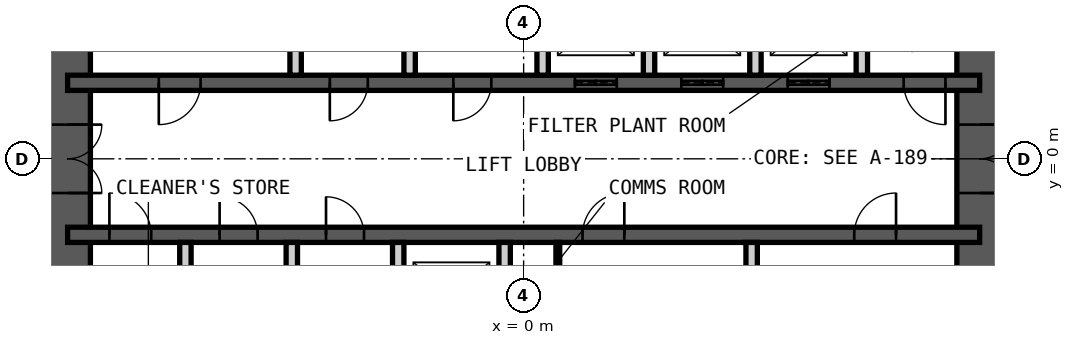
"""IFC4 building model, lengths in metres.
Left out: names, types, materials, properties, quantities, classifications, styles, units other than length and angle.
Written with IfcOpenShell. Run it as: python <this file> out.ifc"""

import sys

from ifc_helpers import new_model, si_unit, direction, frame, frame_2d, origin, place, context, subcontext, project, spatial, rectangle, extrude, element, fill, save


model = new_model("IFC4")
c1 = context("Model", 3, precision=1e-05, world=origin(), true_north=direction((0.0, 1.0)))
c2 = subcontext(c1, "Body", "Model", "MODEL_VIEW")
j1 = project(units=[si_unit("LENGTHUNIT", "METRE"), si_unit("PLANEANGLEUNIT", "RADIAN")], contexts=[c1])
p1 = place(None, origin())
s1 = spatial("IfcSite", under=j1, at=p1, CompositionType="ELEMENT")
p2 = place(p1, origin())
s2 = spatial("IfcBuilding", under=s1, at=p2, CompositionType="ELEMENT")
p3 = place(p2, frame((0.0, 0.0, 239.2)))
s3 = spatial("IfcBuildingStorey", under=s2, at=p3, CompositionType="ELEMENT", Elevation=239.2)
p4 = place(p3, frame((12.0, -9.0, 0.0), z_axis=(0.0, 0.0, 1.0), x_axis=(0.0, 1.0, 0.0)))
e1 = element("IfcWall", 1, at=p4, inside=s3, PredefinedType="SHEAR", context=c2, shape_type="SweptSolid", body=[
    extrude(rectangle(XDim=18.0, YDim=1.2, at=frame_2d((9.0, 0.0))), origin(), (0.0, 0.0, 1.0), 4.2),
])
p5 = place(p4, frame((8.1, 0.0, 0.0)))
e2 = element("IfcOpeningElement", 2, at=p5, cuts=e1, PredefinedType="OPENING", context=c2, shape_type="SweptSolid", body=[
    extrude(rectangle(XDim=1.8, YDim=2.1, at=frame_2d((0.9, 1.05))), frame((0.0, 0.61, 0.0), z_axis=(0.0, -1.0, 0.0), x_axis=(1.0, 0.0, 0.0)), (0.0, 0.0, 1.0), 1.22),
])
p6 = place(p3, frame((-12.0, -9.0, 0.0), z_axis=(0.0, 0.0, 1.0), x_axis=(0.0, 1.0, 0.0)))
e3 = element("IfcWall", 3, at=p6, inside=s3, PredefinedType="SHEAR", context=c2, shape_type="SweptSolid", body=[
    extrude(rectangle(XDim=18.0, YDim=1.2, at=frame_2d((9.0, 0.0))), origin(), (0.0, 0.0, 1.0), 4.2),
])
p7 = place(p6, frame((8.1, 0.0, 0.0)))
e4 = element("IfcOpeningElement", 4, at=p7, cuts=e3, PredefinedType="OPENING", context=c2, shape_type="SweptSolid", body=[
    extrude(rectangle(XDim=1.8, YDim=2.1, at=frame_2d((0.9, 1.05))), frame((0.0, 0.61, 0.0), z_axis=(0.0, -1.0, 0.0), x_axis=(1.0, 0.0, 0.0)), (0.0, 0.0, 1.0), 1.22),
])
p8 = place(p3, frame((-12.0, 2.0, 0.0), z_axis=(0.0, 0.0, 1.0), x_axis=(1.0, 0.0, 0.0)))
e5 = element("IfcWall", 5, at=p8, inside=s3, PredefinedType="SHEAR", context=c2, shape_type="SweptSolid", body=[
    extrude(rectangle(XDim=24.0, YDim=0.4, at=frame_2d((12.0, 0.0))), origin(), (0.0, 0.0, 1.0), 4.2),
])
p9 = place(p8, frame((2.4, 0.0, 0.0)))
e6 = element("IfcOpeningElement", 6, at=p9, cuts=e5, PredefinedType="OPENING", context=c2, shape_type="SweptSolid", body=[
    extrude(rectangle(XDim=1.1, YDim=2.1, at=frame_2d((0.55, 1.05))), frame((0.0, 0.21, 0.0), z_axis=(0.0, -1.0, 0.0), x_axis=(1.0, 0.0, 0.0)), (0.0, 0.0, 1.0), 0.42),
])
p10 = place(p8, frame((22.0, 0.0, 0.0)))
e7 = element("IfcOpeningElement", 7, at=p10, cuts=e5, PredefinedType="OPENING", context=c2, shape_type="SweptSolid", body=[
    extrude(rectangle(XDim=1.1, YDim=2.1, at=frame_2d((0.55, 1.05))), frame((0.0, 0.21, 0.0), z_axis=(0.0, -1.0, 0.0), x_axis=(1.0, 0.0, 0.0)), (0.0, 0.0, 1.0), 0.42),
])
p11 = place(p8, frame((10.15, 0.0, 0.0)))
e8 = element("IfcOpeningElement", 8, at=p11, cuts=e5, PredefinedType="OPENING", context=c2, shape_type="SweptSolid", body=[
    extrude(rectangle(XDim=1.0, YDim=2.1, at=frame_2d((0.5, 1.05))), frame((0.0, 0.21, 0.0), z_axis=(0.0, -1.0, 0.0), x_axis=(1.0, 0.0, 0.0)), (0.0, 0.0, 1.0), 0.42),
])
p12 = place(p8, frame((6.9, 0.0, 0.0)))
e9 = element("IfcOpeningElement", 9, at=p12, cuts=e5, PredefinedType="OPENING", context=c2, shape_type="SweptSolid", body=[
    extrude(rectangle(XDim=1.0, YDim=2.1, at=frame_2d((0.5, 1.05))), frame((0.0, 0.21, 0.0), z_axis=(0.0, -1.0, 0.0), x_axis=(1.0, 0.0, 0.0)), (0.0, 0.0, 1.0), 0.42),
])
p13 = place(p8, frame((13.35, 0.0, 0.0)))
e10 = element("IfcOpeningElement", 10, at=p13, cuts=e5, PredefinedType="OPENING", context=c2, shape_type="SweptSolid", body=[
    extrude(rectangle(XDim=1.1, YDim=2.4, at=frame_2d((0.55, 1.2))), frame((0.0, 0.21, 0.0), z_axis=(0.0, -1.0, 0.0), x_axis=(1.0, 0.0, 0.0)), (0.0, 0.0, 1.0), 0.42),
])
p14 = place(p8, frame((16.15, 0.0, 0.0)))
e11 = element("IfcOpeningElement", 11, at=p14, cuts=e5, PredefinedType="OPENING", context=c2, shape_type="SweptSolid", body=[
    extrude(rectangle(XDim=1.1, YDim=2.4, at=frame_2d((0.55, 1.2))), frame((0.0, 0.21, 0.0), z_axis=(0.0, -1.0, 0.0), x_axis=(1.0, 0.0, 0.0)), (0.0, 0.0, 1.0), 0.42),
])
p15 = place(p8, frame((18.95, 0.0, 0.0)))
e12 = element("IfcOpeningElement", 12, at=p15, cuts=e5, PredefinedType="OPENING", context=c2, shape_type="SweptSolid", body=[
    extrude(rectangle(XDim=1.1, YDim=2.4, at=frame_2d((0.55, 1.2))), frame((0.0, 0.21, 0.0), z_axis=(0.0, -1.0, 0.0), x_axis=(1.0, 0.0, 0.0)), (0.0, 0.0, 1.0), 0.42),
])
p16 = place(p3, frame((-12.0, -2.0, 0.0), z_axis=(0.0, 0.0, 1.0), x_axis=(1.0, 0.0, 0.0)))
e13 = element("IfcWall", 13, at=p16, inside=s3, PredefinedType="SHEAR", context=c2, shape_type="SweptSolid", body=[
    extrude(rectangle(XDim=24.0, YDim=0.4, at=frame_2d((12.0, 0.0))), origin(), (0.0, 0.0, 1.0), 4.2),
])
p17 = place(p16, frame((1.1, 0.0, 0.0)))
e14 = element("IfcOpeningElement", 14, at=p17, cuts=e13, PredefinedType="OPENING", context=c2, shape_type="SweptSolid", body=[
    extrude(rectangle(XDim=1.1, YDim=2.1, at=frame_2d((0.55, 1.05))), frame((0.0, 0.21, 0.0), z_axis=(0.0, -1.0, 0.0), x_axis=(1.0, 0.0, 0.0)), (0.0, 0.0, 1.0), 0.42),
])
p18 = place(p16, frame((13.55, 0.0, 0.0)))
e15 = element("IfcOpeningElement", 15, at=p18, cuts=e13, PredefinedType="OPENING", context=c2, shape_type="SweptSolid", body=[
    extrude(rectangle(XDim=1.1, YDim=2.1, at=frame_2d((0.55, 1.05))), frame((0.0, 0.21, 0.0), z_axis=(0.0, -1.0, 0.0), x_axis=(1.0, 0.0, 0.0)), (0.0, 0.0, 1.0), 0.42),
])
p19 = place(p16, frame((20.7, 0.0, 0.0)))
e16 = element("IfcOpeningElement", 16, at=p19, cuts=e13, PredefinedType="OPENING", context=c2, shape_type="SweptSolid", body=[
    extrude(rectangle(XDim=1.1, YDim=2.1, at=frame_2d((0.55, 1.05))), frame((0.0, 0.21, 0.0), z_axis=(0.0, -1.0, 0.0), x_axis=(1.0, 0.0, 0.0)), (0.0, 0.0, 1.0), 0.42),
])
p20 = place(p16, frame((4.0, 0.0, 0.0)))
e17 = element("IfcOpeningElement", 17, at=p20, cuts=e13, PredefinedType="OPENING", context=c2, shape_type="SweptSolid", body=[
    extrude(rectangle(XDim=1.0, YDim=2.1, at=frame_2d((0.5, 1.05))), frame((0.0, 0.21, 0.0), z_axis=(0.0, -1.0, 0.0), x_axis=(1.0, 0.0, 0.0)), (0.0, 0.0, 1.0), 0.42),
])
p21 = place(p16, frame((6.8, 0.0, 0.0)))
e18 = element("IfcOpeningElement", 18, at=p21, cuts=e13, PredefinedType="OPENING", context=c2, shape_type="SweptSolid", body=[
    extrude(rectangle(XDim=1.0, YDim=2.1, at=frame_2d((0.5, 1.05))), frame((0.0, 0.21, 0.0), z_axis=(0.0, -1.0, 0.0), x_axis=(1.0, 0.0, 0.0)), (0.0, 0.0, 1.0), 0.42),
])
for number, where, z_axis, x_axis in (
    (19, (-6.0, 2.2, 0.0), (0.0, 0.0, 1.0), (0.0, 1.0, 0.0)),
    (20, (-3.0, 2.2, 0.0), (0.0, 0.0, 1.0), (0.0, 1.0, 0.0)),
    (21, (0.5, 2.2, 0.0), (0.0, 0.0, 1.0), (0.0, 1.0, 0.0)),
    (22, (3.3, 2.2, 0.0), (0.0, 0.0, 1.0), (0.0, 1.0, 0.0)),
    (23, (6.1, 2.2, 0.0), (0.0, 0.0, 1.0), (0.0, 1.0, 0.0)),
    (24, (8.9, 2.2, 0.0), (0.0, 0.0, 1.0), (0.0, 1.0, 0.0)),
    (25, (-8.9, -4.85, 0.0), (0.0, 0.0, 1.0), (0.0, 1.0, 0.0)),
    (26, (-6.1, -4.85, 0.0), (0.0, 0.0, 1.0), (0.0, 1.0, 0.0)),
    (27, (-3.3, -4.85, 0.0), (0.0, 0.0, 1.0), (0.0, 1.0, 0.0)),
    (28, (-0.5, -4.85, 0.0), (0.0, 0.0, 1.0), (0.0, 1.0, 0.0)),
    (29, (6.0, -4.85, 0.0), (0.0, 0.0, 1.0), (0.0, 1.0, 0.0)),
):
    element("IfcWall", number, at=place(p3, frame(where, z_axis=z_axis, x_axis=x_axis)), inside=s3, PredefinedType="PARTITIONING", context=c2, shape_type="SweptSolid", body=[
        extrude(rectangle(XDim=2.65, YDim=0.3, at=frame_2d((1.325, 0.0))), origin(), (0.0, 0.0, 1.0), 3.98),
    ])
p22 = place(p3, frame((0.9, -4.85, 0.0), z_axis=(0.0, 0.0, 1.0), x_axis=(0.0, 1.0, 0.0)))
e30 = element("IfcWall", 30, at=p22, inside=s3, PredefinedType="PARTITIONING", context=c2, shape_type="SweptSolid", body=[
    extrude(rectangle(XDim=2.65, YDim=0.1, at=frame_2d((1.325, 0.0))), origin(), (0.0, 0.0, 1.0), 3.98),
])
p23 = place(p22, frame((0.1, 0.0, 0.0)))
e31 = element("IfcOpeningElement", 31, at=p23, cuts=e30, PredefinedType="OPENING", context=c2, shape_type="SweptSolid", body=[
    extrude(rectangle(XDim=1.0, YDim=2.4, at=frame_2d((0.5, 1.2))), frame((0.0, 0.06, 0.0), z_axis=(0.0, -1.0, 0.0), x_axis=(1.0, 0.0, 0.0)), (0.0, 0.0, 1.0), 0.12),
])
p24 = place(p9, origin())
e32 = element("IfcDoor", 32, at=p24, inside=s3, OperationType="SINGLE_SWING_LEFT", PredefinedType="DOOR", context=c2, shape_type="SweptSolid", body=[
    extrude(rectangle(XDim=1.1, YDim=2.1, at=frame_2d((0.55, 1.05))), frame((0.0, 0.025, 0.0), z_axis=(0.0, -1.0, 0.0), x_axis=(1.0, 0.0, 0.0)), (0.0, 0.0, 1.0), 0.05),
])
fill(e6, e32)
p25 = place(p17, origin())
e33 = element("IfcDoor", 33, at=p25, inside=s3, OperationType="SINGLE_SWING_RIGHT", PredefinedType="DOOR", context=c2, shape_type="SweptSolid", body=[
    extrude(rectangle(XDim=1.1, YDim=2.1, at=frame_2d((0.55, 1.05))), frame((0.0, 0.025, 0.0), z_axis=(0.0, -1.0, 0.0), x_axis=(1.0, 0.0, 0.0)), (0.0, 0.0, 1.0), 0.05),
])
fill(e14, e33)
p26 = place(p10, origin())
e34 = element("IfcDoor", 34, at=p26, inside=s3, OperationType="SINGLE_SWING_RIGHT", PredefinedType="DOOR", context=c2, shape_type="SweptSolid", body=[
    extrude(rectangle(XDim=1.1, YDim=2.1, at=frame_2d((0.55, 1.05))), frame((0.0, 0.025, 0.0), z_axis=(0.0, -1.0, 0.0), x_axis=(1.0, 0.0, 0.0)), (0.0, 0.0, 1.0), 0.05),
])
fill(e7, e34)
p27 = place(p11, origin())
e35 = element("IfcDoor", 35, at=p27, inside=s3, OperationType="SINGLE_SWING_LEFT", PredefinedType="DOOR", context=c2, shape_type="SweptSolid", body=[
    extrude(rectangle(XDim=1.0, YDim=2.1, at=frame_2d((0.5, 1.05))), frame((0.0, 0.025, 0.0), z_axis=(0.0, -1.0, 0.0), x_axis=(1.0, 0.0, 0.0)), (0.0, 0.0, 1.0), 0.05),
])
fill(e8, e35)
p28 = place(p18, origin())
e36 = element("IfcDoor", 36, at=p28, inside=s3, OperationType="SINGLE_SWING_LEFT", PredefinedType="DOOR", context=c2, shape_type="SweptSolid", body=[
    extrude(rectangle(XDim=1.1, YDim=2.1, at=frame_2d((0.55, 1.05))), frame((0.0, 0.025, 0.0), z_axis=(0.0, -1.0, 0.0), x_axis=(1.0, 0.0, 0.0)), (0.0, 0.0, 1.0), 0.05),
])
fill(e15, e36)
p29 = place(p19, origin())
e37 = element("IfcDoor", 37, at=p29, inside=s3, OperationType="SINGLE_SWING_LEFT", PredefinedType="DOOR", context=c2, shape_type="SweptSolid", body=[
    extrude(rectangle(XDim=1.1, YDim=2.1, at=frame_2d((0.55, 1.05))), frame((0.0, 0.025, 0.0), z_axis=(0.0, -1.0, 0.0), x_axis=(1.0, 0.0, 0.0)), (0.0, 0.0, 1.0), 0.05),
])
fill(e16, e37)
p30 = place(p5, origin())
e38 = element("IfcDoor", 38, at=p30, inside=s3, OperationType="DOUBLE_DOOR_DOUBLE_SWING", PredefinedType="DOOR", context=c2, shape_type="SweptSolid", body=[
    extrude(rectangle(XDim=1.8, YDim=2.1, at=frame_2d((0.9, 1.05))), frame((0.0, 0.025, 0.0), z_axis=(0.0, -1.0, 0.0), x_axis=(1.0, 0.0, 0.0)), (0.0, 0.0, 1.0), 0.05),
])
fill(e2, e38)
p31 = place(p7, origin())
e39 = element("IfcDoor", 39, at=p31, inside=s3, OperationType="DOUBLE_DOOR_DOUBLE_SWING", PredefinedType="DOOR", context=c2, shape_type="SweptSolid", body=[
    extrude(rectangle(XDim=1.8, YDim=2.1, at=frame_2d((0.9, 1.05))), frame((0.0, 0.025, 0.0), z_axis=(0.0, -1.0, 0.0), x_axis=(1.0, 0.0, 0.0)), (0.0, 0.0, 1.0), 0.05),
])
fill(e4, e39)
p32 = place(p12, origin())
e40 = element("IfcDoor", 40, at=p32, inside=s3, OperationType="SINGLE_SWING_LEFT", PredefinedType="DOOR", context=c2, shape_type="SweptSolid", body=[
    extrude(rectangle(XDim=1.0, YDim=2.1, at=frame_2d((0.5, 1.05))), frame((0.0, 0.025, 0.0), z_axis=(0.0, -1.0, 0.0), x_axis=(1.0, 0.0, 0.0)), (0.0, 0.0, 1.0), 0.05),
])
fill(e9, e40)
p33 = place(p13, origin())
e41 = element("IfcDoor", 41, at=p33, inside=s3, OperationType="DOUBLE_DOOR_SLIDING", PredefinedType="DOOR", context=c2, shape_type="SweptSolid", body=[
    extrude(rectangle(XDim=1.1, YDim=2.4, at=frame_2d((0.55, 1.2))), frame((0.0, 0.025, 0.0), z_axis=(0.0, -1.0, 0.0), x_axis=(1.0, 0.0, 0.0)), (0.0, 0.0, 1.0), 0.05),
])
fill(e10, e41)
p34 = place(p14, origin())
e42 = element("IfcDoor", 42, at=p34, inside=s3, OperationType="DOUBLE_DOOR_SLIDING", PredefinedType="DOOR", context=c2, shape_type="SweptSolid", body=[
    extrude(rectangle(XDim=1.1, YDim=2.4, at=frame_2d((0.55, 1.2))), frame((0.0, 0.025, 0.0), z_axis=(0.0, -1.0, 0.0), x_axis=(1.0, 0.0, 0.0)), (0.0, 0.0, 1.0), 0.05),
])
fill(e11, e42)
p35 = place(p15, origin())
e43 = element("IfcDoor", 43, at=p35, inside=s3, OperationType="DOUBLE_DOOR_SLIDING", PredefinedType="DOOR", context=c2, shape_type="SweptSolid", body=[
    extrude(rectangle(XDim=1.1, YDim=2.4, at=frame_2d((0.55, 1.2))), frame((0.0, 0.025, 0.0), z_axis=(0.0, -1.0, 0.0), x_axis=(1.0, 0.0, 0.0)), (0.0, 0.0, 1.0), 0.05),
])
fill(e12, e43)
p36 = place(p20, origin())
e44 = element("IfcDoor", 44, at=p36, inside=s3, OperationType="SINGLE_SWING_RIGHT", PredefinedType="DOOR", context=c2, shape_type="SweptSolid", body=[
    extrude(rectangle(XDim=1.0, YDim=2.1, at=frame_2d((0.5, 1.05))), frame((0.0, 0.025, 0.0), z_axis=(0.0, -1.0, 0.0), x_axis=(1.0, 0.0, 0.0)), (0.0, 0.0, 1.0), 0.05),
])
fill(e17, e44)
p37 = place(p21, origin())
e45 = element("IfcDoor", 45, at=p37, inside=s3, OperationType="SINGLE_SWING_RIGHT", PredefinedType="DOOR", context=c2, shape_type="SweptSolid", body=[
    extrude(rectangle(XDim=1.0, YDim=2.1, at=frame_2d((0.5, 1.05))), frame((0.0, 0.025, 0.0), z_axis=(0.0, -1.0, 0.0), x_axis=(1.0, 0.0, 0.0)), (0.0, 0.0, 1.0), 0.05),
])
fill(e18, e45)
save(model, sys.argv[1])
